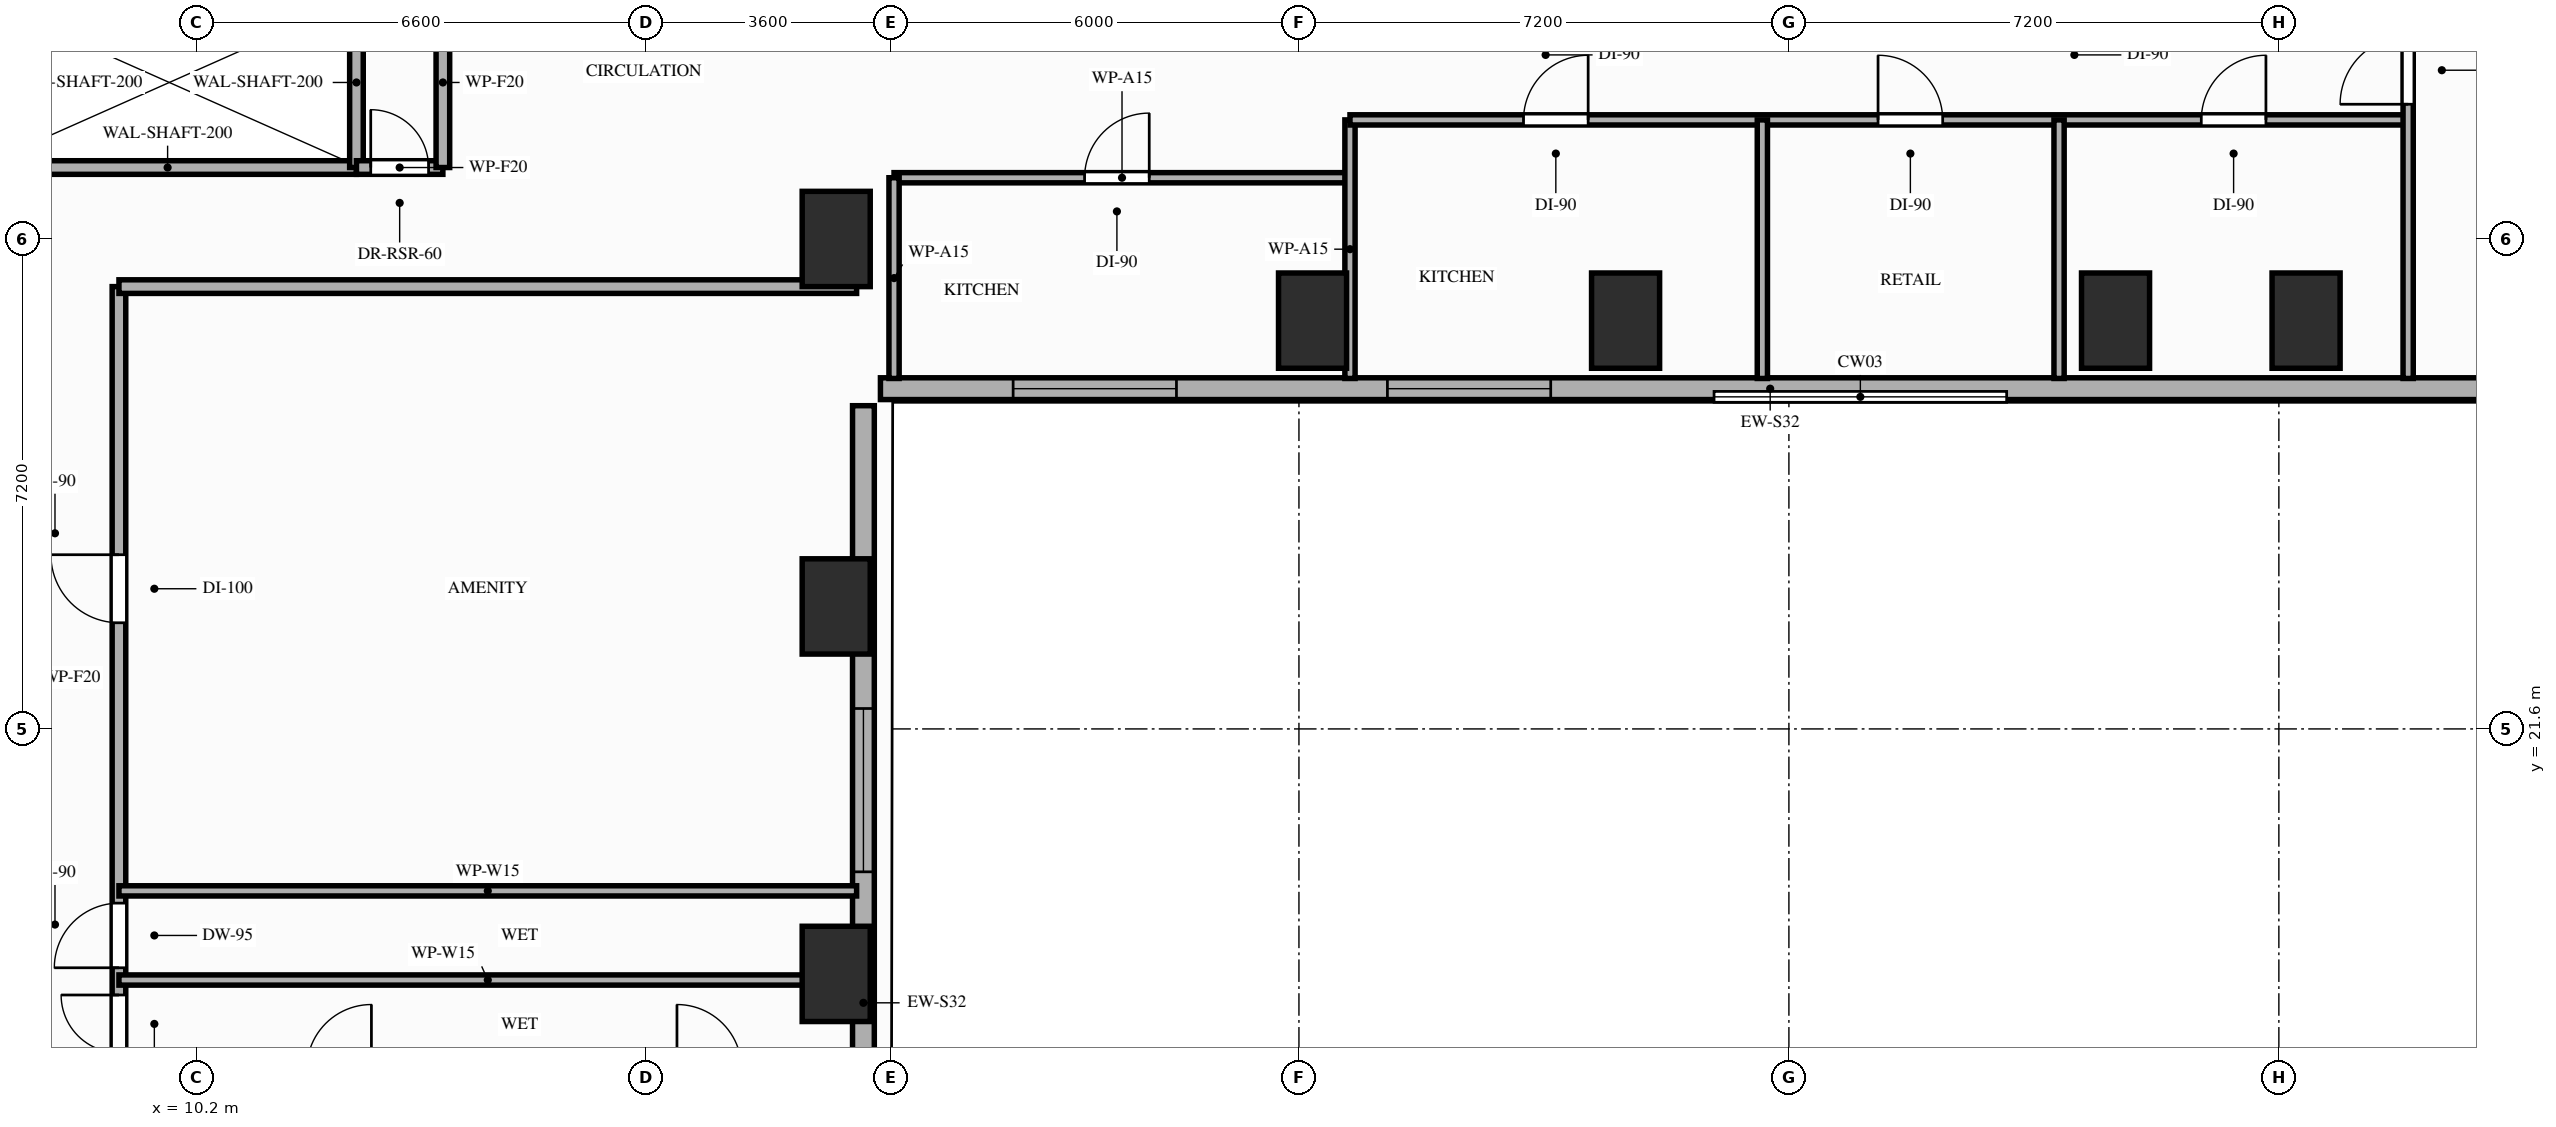
"""IFC4 building model, lengths in metres.
Left out: names, types, materials, properties, quantities, classifications, styles, units other than length and angle.
Written with IfcOpenShell. Run it as: python <this file> out.ifc"""

import sys

from ifc_helpers import new_model, si_unit, direction, frame, frame_2d, origin, origin_2d, place, context, subcontext, project, spatial, rectangle, extrude, element, fill, save


model = new_model("IFC4")
c1 = context("Model", 3, precision=1e-05, world=origin(), true_north=direction((0.0, 1.0)))
c2 = subcontext(c1, "Body", "Model", "MODEL_VIEW")
j1 = project(units=[si_unit("LENGTHUNIT", "METRE"), si_unit("PLANEANGLEUNIT", "RADIAN")], contexts=[c1])
p1 = place(None, origin())
s1 = spatial("IfcSite", under=j1, at=p1, CompositionType="ELEMENT")
p2 = place(p1, origin())
s2 = spatial("IfcBuilding", under=s1, at=p2, CompositionType="ELEMENT")
p3 = place(p2, frame((0.0, 0.0, 59.6)))
s3 = spatial("IfcBuildingStorey", under=s2, at=p3, CompositionType="ELEMENT", Elevation=59.6)
for number, where, z_axis, x_axis in (
    (1, (19.6, 18.0, 0.0), (0.0, 0.0, 1.0), (1.0, 0.0, 0.0)),
    (2, (19.6, 23.4, 0.0), (0.0, 0.0, 1.0), (1.0, 0.0, 0.0)),
    (3, (19.6, 28.8, 0.0), (0.0, 0.0, 1.0), (1.0, 0.0, 0.0)),
    (4, (26.6, 27.6, 0.0), (0.0, 0.0, 1.0), (1.0, 0.0, 0.0)),
    (5, (31.2, 27.6, 0.0), (0.0, 0.0, 1.0), (1.0, 0.0, 0.0)),
    (6, (38.4, 27.6, 0.0), (0.0, 0.0, 1.0), (1.0, 0.0, 0.0)),
    (7, (41.2, 27.6, 0.0), (0.0, 0.0, 1.0), (1.0, 0.0, 0.0)),
):
    element("IfcColumn", number, at=place(p3, frame(where, z_axis=z_axis, x_axis=x_axis)), inside=s3, PredefinedType="COLUMN", context=c2, shape_type="SweptSolid", body=[
        extrude(rectangle(XDim=1.0, YDim=1.4, at=origin_2d()), origin(), (0.0, 0.0, 1.0), 3.2),
    ])
p4 = place(p3, frame((20.0, 8.8, 0.0), z_axis=(0.0, 0.0, 1.0), x_axis=(0.0, 1.0, 0.0)))
e8 = element("IfcWall", 8, at=p4, inside=s3, PredefinedType="STANDARD", context=c2, shape_type="SweptSolid", body=[
    extrude(rectangle(XDim=17.55, YDim=0.32, at=frame_2d((8.775, 0.0))), origin(), (0.0, 0.0, 1.0), 2.41),
])
p5 = place(p4, frame((5.15, 0.0, 0.85)))
e9 = element("IfcOpeningElement", 9, at=p5, cuts=e8, PredefinedType="OPENING", context=c2, shape_type="SweptSolid", body=[
    extrude(rectangle(XDim=2.4, YDim=1.31, at=frame_2d((1.2, 0.655))), frame((0.0, 0.17, 0.0), z_axis=(0.0, -1.0, 0.0), x_axis=(1.0, 0.0, 0.0)), (0.0, 0.0, 1.0), 0.34),
])
p6 = place(p4, frame((10.7, 0.0, 0.85)))
e10 = element("IfcOpeningElement", 10, at=p6, cuts=e8, PredefinedType="OPENING", context=c2, shape_type="SweptSolid", body=[
    extrude(rectangle(XDim=2.4, YDim=1.31, at=frame_2d((1.2, 0.655))), frame((0.0, 0.17, 0.0), z_axis=(0.0, -1.0, 0.0), x_axis=(1.0, 0.0, 0.0)), (0.0, 0.0, 1.0), 0.34),
])
p7 = place(p3, frame((20.25, 26.6, 0.0), z_axis=(0.0, 0.0, 1.0), x_axis=(1.0, 0.0, 0.0)))
e11 = element("IfcWall", 11, at=p7, inside=s3, PredefinedType="STANDARD", context=c2, shape_type="SweptSolid", body=[
    extrude(rectangle(XDim=26.15, YDim=0.32, at=frame_2d((13.075, 0.0))), origin(), (0.0, 0.0, 1.0), 2.7),
])
p8 = place(p7, frame((1.95, 0.0, 0.85)))
e12 = element("IfcOpeningElement", 12, at=p8, cuts=e11, PredefinedType="OPENING", context=c2, shape_type="SweptSolid", body=[
    extrude(rectangle(XDim=2.4, YDim=1.6, at=frame_2d((1.2, 0.8))), frame((0.0, 0.17, 0.0), z_axis=(0.0, -1.0, 0.0), x_axis=(1.0, 0.0, 0.0)), (0.0, 0.0, 1.0), 0.34),
])
p9 = place(p7, frame((7.45, 0.0, 0.85)))
e13 = element("IfcOpeningElement", 13, at=p9, cuts=e11, PredefinedType="OPENING", context=c2, shape_type="SweptSolid", body=[
    extrude(rectangle(XDim=2.4, YDim=1.6, at=frame_2d((1.2, 0.8))), frame((0.0, 0.17, 0.0), z_axis=(0.0, -1.0, 0.0), x_axis=(1.0, 0.0, 0.0)), (0.0, 0.0, 1.0), 0.34),
])
p10 = place(p3, frame((7.0, 29.85, 0.0), z_axis=(0.0, 0.0, 1.0), x_axis=(1.0, 0.0, 0.0)))
e14 = element("IfcWall", 14, at=p10, inside=s3, PredefinedType="MOVABLE", context=c2, shape_type="SweptSolid", body=[
    extrude(rectangle(XDim=5.55, YDim=0.2, at=frame_2d((2.775, 0.0))), origin(), (0.0, 0.0, 1.0), 3.02),
])
p11 = place(p3, frame((12.55, 29.85, 0.0), z_axis=(0.0, 0.0, 1.0), x_axis=(0.0, 1.0, 0.0)))
e15 = element("IfcWall", 15, at=p11, inside=s3, PredefinedType="MOVABLE", context=c2, shape_type="SweptSolid", body=[
    extrude(rectangle(XDim=2.5, YDim=0.2, at=frame_2d((1.25, 0.0))), origin(), (0.0, 0.0, 1.0), 3.02),
])
p12 = place(p3, frame((12.55, 29.85, 0.0), z_axis=(0.0, 0.0, 1.0), x_axis=(1.0, 0.0, 0.0)))
e16 = element("IfcWall", 16, at=p12, inside=s3, PredefinedType="PARTITIONING", context=c2, shape_type="SweptSolid", body=[
    extrude(rectangle(XDim=1.27, YDim=0.2, at=frame_2d((0.635, 0.0))), origin(), (0.0, 0.0, 1.0), 3.02),
])
p13 = place(p12, frame((0.21, 0.0, 0.0)))
e17 = element("IfcOpeningElement", 17, at=p13, cuts=e16, PredefinedType="OPENING", context=c2, shape_type="SweptSolid", body=[
    extrude(rectangle(XDim=0.85, YDim=2.05, at=frame_2d((0.425, 1.025))), frame((0.0, 0.11, 0.0), z_axis=(0.0, -1.0, 0.0), x_axis=(1.0, 0.0, 0.0)), (0.0, 0.0, 1.0), 0.22),
])
p14 = place(p3, frame((13.82, 29.85, 0.0), z_axis=(0.0, 0.0, 1.0), x_axis=(0.0, 1.0, 0.0)))
e18 = element("IfcWall", 18, at=p14, inside=s3, PredefinedType="PARTITIONING", context=c2, shape_type="SweptSolid", body=[
    extrude(rectangle(XDim=2.5, YDim=0.2, at=frame_2d((1.25, 0.0))), origin(), (0.0, 0.0, 1.0), 3.02),
])
p15 = place(p3, frame((9.06, 16.6, 0.0), z_axis=(0.0, 0.0, 1.0), x_axis=(0.0, 1.0, 0.0)))
e19 = element("IfcWall", 19, at=p15, inside=s3, PredefinedType="PARTITIONING", context=c2, shape_type="SweptSolid", body=[
    extrude(rectangle(XDim=11.5, YDim=0.2, at=frame_2d((5.75, 0.0))), origin(), (0.0, 0.0, 1.0), 2.41),
])
p16 = place(p15, frame((0.24, 0.0, 0.0)))
e20 = element("IfcOpeningElement", 20, at=p16, cuts=e19, PredefinedType="OPENING", context=c2, shape_type="SweptSolid", body=[
    extrude(rectangle(XDim=0.85, YDim=2.1, at=frame_2d((0.425, 1.05))), frame((0.0, 0.11, 0.0), z_axis=(0.0, -1.0, 0.0), x_axis=(1.0, 0.0, 0.0)), (0.0, 0.0, 1.0), 0.22),
])
p17 = place(p15, frame((1.49, 0.0, 0.0)))
e21 = element("IfcOpeningElement", 21, at=p17, cuts=e19, PredefinedType="OPENING", context=c2, shape_type="SweptSolid", body=[
    extrude(rectangle(XDim=0.95, YDim=2.1, at=frame_2d((0.475, 1.05))), frame((0.0, 0.11, 0.0), z_axis=(0.0, -1.0, 0.0), x_axis=(1.0, 0.0, 0.0)), (0.0, 0.0, 1.0), 0.22),
])
p18 = place(p15, frame((6.56, 0.0, 0.0)))
e22 = element("IfcOpeningElement", 22, at=p18, cuts=e19, PredefinedType="OPENING", context=c2, shape_type="SweptSolid", body=[
    extrude(rectangle(XDim=1.0, YDim=2.15, at=frame_2d((0.5, 1.075))), frame((0.0, 0.11, 0.0), z_axis=(0.0, -1.0, 0.0), x_axis=(1.0, 0.0, 0.0)), (0.0, 0.0, 1.0), 0.22),
])
p19 = place(p3, frame((9.06, 28.1, 0.0), z_axis=(0.0, 0.0, 1.0), x_axis=(1.0, 0.0, 0.0)))
e23 = element("IfcWall", 23, at=p19, inside=s3, PredefinedType="PARTITIONING", context=c2, shape_type="SweptSolid", body=[
    extrude(rectangle(XDim=10.84, YDim=0.2, at=frame_2d((5.42, 0.0))), origin(), (0.0, 0.0, 1.0), 2.41),
])
p20 = place(p3, frame((20.45, 29.7, 0.0), z_axis=(0.0, 0.0, 1.0), x_axis=(1.0, 0.0, 0.0)))
e24 = element("IfcWall", 24, at=p20, inside=s3, PredefinedType="PARTITIONING", context=c2, shape_type="SweptSolid", body=[
    extrude(rectangle(XDim=6.7, YDim=0.15, at=frame_2d((3.35, 0.0))), origin(), (0.0, 0.0, 1.0), 3.02),
])
p21 = place(p20, frame((2.8, 0.0, 0.0)))
e25 = element("IfcOpeningElement", 25, at=p21, cuts=e24, PredefinedType="OPENING", context=c2, shape_type="SweptSolid", body=[
    extrude(rectangle(XDim=0.95, YDim=2.15, at=frame_2d((0.475, 1.075))), frame((0.0, 0.085, 0.0), z_axis=(0.0, -1.0, 0.0), x_axis=(1.0, 0.0, 0.0)), (0.0, 0.0, 1.0), 0.17),
])
p22 = place(p3, frame((20.45, 26.75, 0.0), z_axis=(0.0, 0.0, 1.0), x_axis=(0.0, 1.0, 0.0)))
e26 = element("IfcWall", 26, at=p22, inside=s3, PredefinedType="PARTITIONING", context=c2, shape_type="SweptSolid", body=[
    extrude(rectangle(XDim=2.95, YDim=0.15, at=frame_2d((1.475, 0.0))), origin(), (0.0, 0.0, 1.0), 2.41),
])
p23 = place(p3, frame((27.15, 26.75, 0.0), z_axis=(0.0, 0.0, 1.0), x_axis=(0.0, 1.0, 0.0)))
e27 = element("IfcWall", 27, at=p23, inside=s3, PredefinedType="PARTITIONING", context=c2, shape_type="SweptSolid", body=[
    extrude(rectangle(XDim=3.8, YDim=0.15, at=frame_2d((1.9, 0.0))), origin(), (0.0, 0.0, 1.0), 2.41),
])
for number, where, z_axis, x_axis in (
    (28, (9.06, 17.91, 0.0), (0.0, 0.0, 1.0), (1.0, 0.0, 0.0)),
    (29, (9.06, 19.22, 0.0), (0.0, 0.0, 1.0), (1.0, 0.0, 0.0)),
):
    element("IfcWall", number, at=place(p3, frame(where, z_axis=z_axis, x_axis=x_axis)), inside=s3, PredefinedType="PARTITIONING", context=c2, shape_type="SweptSolid", body=[
        extrude(rectangle(XDim=10.84, YDim=0.15, at=frame_2d((5.42, 0.0))), origin(), (0.0, 0.0, 1.0), 2.41),
    ])
p24 = place(p3, frame((27.15, 30.55, 0.0), z_axis=(0.0, 0.0, 1.0), x_axis=(1.0, 0.0, 0.0)))
e30 = element("IfcWall", 30, at=p24, inside=s3, PredefinedType="PARTITIONING", context=c2, shape_type="SweptSolid", body=[
    extrude(rectangle(XDim=15.55, YDim=0.15, at=frame_2d((7.775, 0.0))), origin(), (0.0, 0.0, 1.0), 2.41),
])
p25 = place(p24, frame((2.55, 0.0, 0.0)))
e31 = element("IfcOpeningElement", 31, at=p25, cuts=e30, PredefinedType="OPENING", context=c2, shape_type="SweptSolid", body=[
    extrude(rectangle(XDim=0.95, YDim=2.15, at=frame_2d((0.475, 1.075))), frame((0.0, 0.085, 0.0), z_axis=(0.0, -1.0, 0.0), x_axis=(1.0, 0.0, 0.0)), (0.0, 0.0, 1.0), 0.17),
])
p26 = place(p24, frame((7.76, 0.0, 0.0)))
e32 = element("IfcOpeningElement", 32, at=p26, cuts=e30, PredefinedType="OPENING", context=c2, shape_type="SweptSolid", body=[
    extrude(rectangle(XDim=0.95, YDim=2.15, at=frame_2d((0.475, 1.075))), frame((0.0, 0.085, 0.0), z_axis=(0.0, -1.0, 0.0), x_axis=(1.0, 0.0, 0.0)), (0.0, 0.0, 1.0), 0.17),
])
p27 = place(p24, frame((12.51, 0.0, 0.0)))
e33 = element("IfcOpeningElement", 33, at=p27, cuts=e30, PredefinedType="OPENING", context=c2, shape_type="SweptSolid", body=[
    extrude(rectangle(XDim=0.95, YDim=2.15, at=frame_2d((0.475, 1.075))), frame((0.0, 0.085, 0.0), z_axis=(0.0, -1.0, 0.0), x_axis=(1.0, 0.0, 0.0)), (0.0, 0.0, 1.0), 0.17),
])
p28 = place(p3, frame((42.7, 26.75, 0.0), z_axis=(0.0, 0.0, 1.0), x_axis=(0.0, 1.0, 0.0)))
e34 = element("IfcWall", 34, at=p28, inside=s3, PredefinedType="PARTITIONING", context=c2, shape_type="SweptSolid", body=[
    extrude(rectangle(XDim=15.45, YDim=0.15, at=frame_2d((7.725, 0.0))), origin(), (0.0, 0.0, 1.0), 2.41),
])
p29 = place(p28, frame((4.03, 0.0, 0.0)))
e35 = element("IfcOpeningElement", 35, at=p29, cuts=e34, PredefinedType="OPENING", context=c2, shape_type="SweptSolid", body=[
    extrude(rectangle(XDim=1.0, YDim=2.15, at=frame_2d((0.5, 1.075))), frame((0.0, 0.085, 0.0), z_axis=(0.0, -1.0, 0.0), x_axis=(1.0, 0.0, 0.0)), (0.0, 0.0, 1.0), 0.17),
])
for number, where, z_axis, x_axis in (
    (36, (33.21, 26.75, 0.0), (0.0, 0.0, 1.0), (0.0, 1.0, 0.0)),
    (37, (37.57, 26.75, 0.0), (0.0, 0.0, 1.0), (0.0, 1.0, 0.0)),
):
    element("IfcWall", number, at=place(p3, frame(where, z_axis=z_axis, x_axis=x_axis)), inside=s3, PredefinedType="PARTITIONING", context=c2, shape_type="SweptSolid", body=[
        extrude(rectangle(XDim=3.8, YDim=0.15, at=frame_2d((1.9, 0.0))), origin(), (0.0, 0.0, 1.0), 2.41),
    ])
p30 = place(p6, origin())
e38 = element("IfcWindow", 38, at=p30, inside=s3, PartitioningType="SINGLE_PANEL", PredefinedType="WINDOW", context=c2, shape_type="SweptSolid", body=[
    extrude(rectangle(XDim=2.4, YDim=1.31, at=frame_2d((1.2, 0.655))), frame((0.0, 0.03, 0.0), z_axis=(0.0, -1.0, 0.0), x_axis=(1.0, 0.0, 0.0)), (0.0, 0.0, 1.0), 0.06),
])
fill(e10, e38)
p31 = place(p8, origin())
e39 = element("IfcWindow", 39, at=p31, inside=s3, PartitioningType="SINGLE_PANEL", PredefinedType="WINDOW", context=c2, shape_type="SweptSolid", body=[
    extrude(rectangle(XDim=2.4, YDim=1.6, at=frame_2d((1.2, 0.8))), frame((0.0, 0.03, 0.0), z_axis=(0.0, -1.0, 0.0), x_axis=(1.0, 0.0, 0.0)), (0.0, 0.0, 1.0), 0.06),
])
fill(e12, e39)
p32 = place(p9, origin())
e40 = element("IfcWindow", 40, at=p32, inside=s3, PartitioningType="SINGLE_PANEL", PredefinedType="WINDOW", context=c2, shape_type="SweptSolid", body=[
    extrude(rectangle(XDim=2.4, YDim=1.6, at=frame_2d((1.2, 0.8))), frame((0.0, 0.03, 0.0), z_axis=(0.0, -1.0, 0.0), x_axis=(1.0, 0.0, 0.0)), (0.0, 0.0, 1.0), 0.06),
])
fill(e13, e40)
p33 = place(p13, origin())
e41 = element("IfcDoor", 41, at=p33, inside=s3, OperationType="SINGLE_SWING_LEFT", PredefinedType="DOOR", context=c2, shape_type="SweptSolid", body=[
    extrude(rectangle(XDim=0.85, YDim=2.05, at=frame_2d((0.425, 1.025))), frame((0.0, 0.025, 0.0), z_axis=(0.0, -1.0, 0.0), x_axis=(1.0, 0.0, 0.0)), (0.0, 0.0, 1.0), 0.05),
])
fill(e17, e41)
p34 = place(p21, origin())
e42 = element("IfcDoor", 42, at=p34, inside=s3, OperationType="SINGLE_SWING_RIGHT", PredefinedType="DOOR", context=c2, shape_type="SweptSolid", body=[
    extrude(rectangle(XDim=0.95, YDim=2.15, at=frame_2d((0.475, 1.075))), frame((0.0, 0.025, 0.0), z_axis=(0.0, -1.0, 0.0), x_axis=(1.0, 0.0, 0.0)), (0.0, 0.0, 1.0), 0.05),
])
fill(e25, e42)
p35 = place(p16, origin())
e43 = element("IfcDoor", 43, at=p35, inside=s3, OperationType="SINGLE_SWING_RIGHT", PredefinedType="DOOR", context=c2, shape_type="SweptSolid", body=[
    extrude(rectangle(XDim=0.85, YDim=2.1, at=frame_2d((0.425, 1.05))), frame((0.0, 0.025, 0.0), z_axis=(0.0, -1.0, 0.0), x_axis=(1.0, 0.0, 0.0)), (0.0, 0.0, 1.0), 0.05),
])
fill(e20, e43)
p36 = place(p17, origin())
e44 = element("IfcDoor", 44, at=p36, inside=s3, OperationType="SINGLE_SWING_LEFT", PredefinedType="DOOR", context=c2, shape_type="SweptSolid", body=[
    extrude(rectangle(XDim=0.95, YDim=2.1, at=frame_2d((0.475, 1.05))), frame((0.0, 0.025, 0.0), z_axis=(0.0, -1.0, 0.0), x_axis=(1.0, 0.0, 0.0)), (0.0, 0.0, 1.0), 0.05),
])
fill(e21, e44)
p37 = place(p18, origin())
e45 = element("IfcDoor", 45, at=p37, inside=s3, OperationType="SINGLE_SWING_RIGHT", PredefinedType="DOOR", context=c2, shape_type="SweptSolid", body=[
    extrude(rectangle(XDim=1.0, YDim=2.15, at=frame_2d((0.5, 1.075))), frame((0.0, 0.025, 0.0), z_axis=(0.0, -1.0, 0.0), x_axis=(1.0, 0.0, 0.0)), (0.0, 0.0, 1.0), 0.05),
])
fill(e22, e45)
p38 = place(p29, origin())
e46 = element("IfcDoor", 46, at=p38, inside=s3, OperationType="SINGLE_SWING_LEFT", PredefinedType="DOOR", context=c2, shape_type="SweptSolid", body=[
    extrude(rectangle(XDim=1.0, YDim=2.15, at=frame_2d((0.5, 1.075))), frame((0.0, 0.025, 0.0), z_axis=(0.0, -1.0, 0.0), x_axis=(1.0, 0.0, 0.0)), (0.0, 0.0, 1.0), 0.05),
])
fill(e35, e46)
p39 = place(p25, origin())
e47 = element("IfcDoor", 47, at=p39, inside=s3, OperationType="SINGLE_SWING_RIGHT", PredefinedType="DOOR", context=c2, shape_type="SweptSolid", body=[
    extrude(rectangle(XDim=0.95, YDim=2.15, at=frame_2d((0.475, 1.075))), frame((0.0, 0.025, 0.0), z_axis=(0.0, -1.0, 0.0), x_axis=(1.0, 0.0, 0.0)), (0.0, 0.0, 1.0), 0.05),
])
fill(e31, e47)
p40 = place(p26, origin())
e48 = element("IfcDoor", 48, at=p40, inside=s3, OperationType="SINGLE_SWING_LEFT", PredefinedType="DOOR", context=c2, shape_type="SweptSolid", body=[
    extrude(rectangle(XDim=0.95, YDim=2.15, at=frame_2d((0.475, 1.075))), frame((0.0, 0.025, 0.0), z_axis=(0.0, -1.0, 0.0), x_axis=(1.0, 0.0, 0.0)), (0.0, 0.0, 1.0), 0.05),
])
fill(e32, e48)
p41 = place(p27, origin())
e49 = element("IfcDoor", 49, at=p41, inside=s3, OperationType="SINGLE_SWING_RIGHT", PredefinedType="DOOR", context=c2, shape_type="SweptSolid", body=[
    extrude(rectangle(XDim=0.95, YDim=2.15, at=frame_2d((0.475, 1.075))), frame((0.0, 0.025, 0.0), z_axis=(0.0, -1.0, 0.0), x_axis=(1.0, 0.0, 0.0)), (0.0, 0.0, 1.0), 0.05),
])
fill(e33, e49)
save(model, sys.argv[1])
